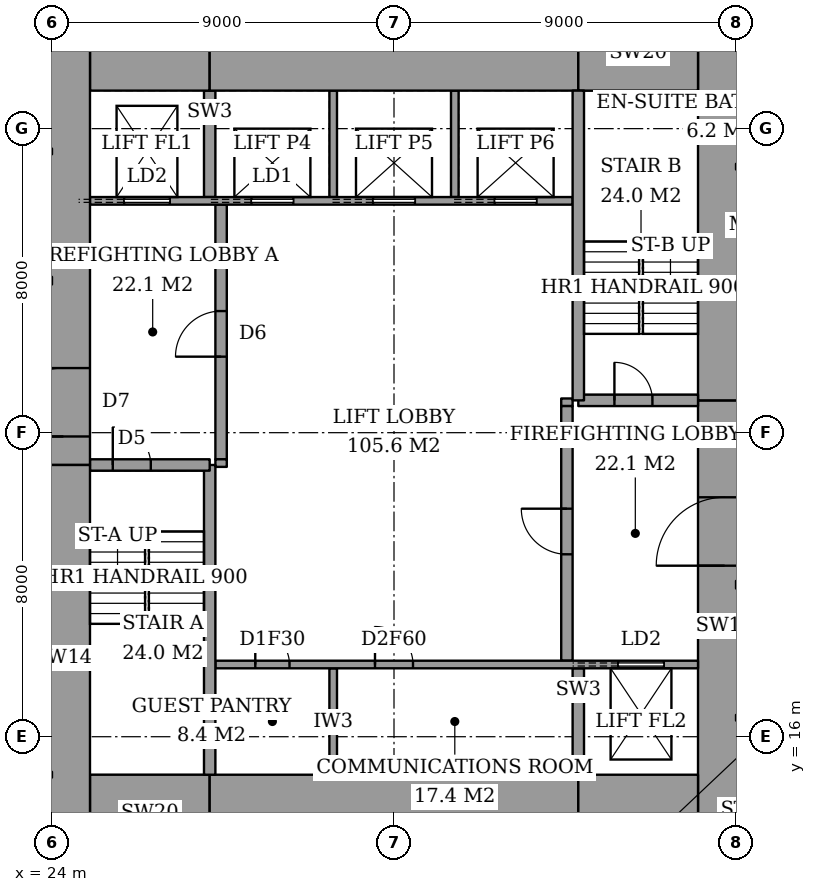
"""IFC4 building model, lengths in metres.
Left out: names, types, materials, properties, quantities, classifications, styles, units other than length and angle.
Written with IfcOpenShell. Run it as: python <this file> out.ifc"""

import sys

from ifc_helpers import new_model, si_unit, direction, frame, frame_2d, origin, place, context, subcontext, project, spatial, rectangle, extrude, element, fill, save


model = new_model("IFC4")
c1 = context("Model", 3, precision=1e-05, world=origin(), true_north=direction((0.0, 1.0)))
c2 = subcontext(c1, "Body", "Model", "MODEL_VIEW")
j1 = project(units=[si_unit("LENGTHUNIT", "METRE"), si_unit("PLANEANGLEUNIT", "RADIAN")], contexts=[c1])
p1 = place(None, origin())
s1 = spatial("IfcSite", under=j1, at=p1, CompositionType="ELEMENT")
p2 = place(p1, origin())
s2 = spatial("IfcBuilding", under=s1, at=p2, CompositionType="ELEMENT")
p3 = place(p2, frame((0.0, 0.0, 193.0)))
s3 = spatial("IfcBuildingStorey", under=s2, at=p3, CompositionType="ELEMENT", Elevation=193.0)
p4 = place(p3, frame((25.0, 14.0, 0.0), z_axis=(0.0, 0.0, 1.0), x_axis=(1.0, 0.0, 0.0)))
e1 = element("IfcWall", 1, at=p4, inside=s3, PredefinedType="SHEAR", context=c2, shape_type="SweptSolid", body=[
    extrude(rectangle(XDim=3.15, YDim=2.0, at=frame_2d((1.575, 0.0))), origin(), (0.0, 0.0, 1.0), 3.6),
])
p5 = place(p3, frame((28.15, 14.0, 0.0), z_axis=(0.0, 0.0, 1.0), x_axis=(1.0, 0.0, 0.0)))
e2 = element("IfcWall", 2, at=p5, inside=s3, PredefinedType="SHEAR", context=c2, shape_type="SweptSolid", body=[
    extrude(rectangle(XDim=9.7, YDim=2.0, at=frame_2d((4.85, 0.0))), origin(), (0.0, 0.0, 1.0), 3.6),
])
for number, where, z_axis, x_axis in (
    (3, (37.85, 14.0, 0.0), (0.0, 0.0, 1.0), (1.0, 0.0, 0.0)),
    (4, (25.0, 34.0, 0.0), (0.0, 0.0, 1.0), (1.0, 0.0, 0.0)),
):
    element("IfcWall", number, at=place(p3, frame(where, z_axis=z_axis, x_axis=x_axis)), inside=s3, PredefinedType="SHEAR", context=c2, shape_type="SweptSolid", body=[
        extrude(rectangle(XDim=3.15, YDim=2.0, at=frame_2d((1.575, 0.0))), origin(), (0.0, 0.0, 1.0), 3.6),
    ])
p6 = place(p3, frame((28.15, 34.0, 0.0), z_axis=(0.0, 0.0, 1.0), x_axis=(1.0, 0.0, 0.0)))
e5 = element("IfcWall", 5, at=p6, inside=s3, PredefinedType="SHEAR", context=c2, shape_type="SweptSolid", body=[
    extrude(rectangle(XDim=9.7, YDim=2.0, at=frame_2d((4.85, 0.0))), origin(), (0.0, 0.0, 1.0), 3.6),
])
p7 = place(p3, frame((37.85, 34.0, 0.0), z_axis=(0.0, 0.0, 1.0), x_axis=(1.0, 0.0, 0.0)))
e6 = element("IfcWall", 6, at=p7, inside=s3, PredefinedType="SHEAR", context=c2, shape_type="SweptSolid", body=[
    extrude(rectangle(XDim=3.15, YDim=2.0, at=frame_2d((1.575, 0.0))), origin(), (0.0, 0.0, 1.0), 3.6),
])
p8 = place(p3, frame((24.3, 13.0, 0.0), z_axis=(0.0, 0.0, 1.0), x_axis=(0.0, 1.0, 0.0)))
e7 = element("IfcWall", 7, at=p8, inside=s3, PredefinedType="SHEAR", context=c2, shape_type="SweptSolid", body=[
    extrude(rectangle(XDim=10.15, YDim=1.4, at=frame_2d((5.075, 0.0))), origin(), (0.0, 0.0, 1.0), 3.6),
])
p9 = place(p3, frame((24.3, 23.15, 0.0), z_axis=(0.0, 0.0, 1.0), x_axis=(0.0, 1.0, 0.0)))
e8 = element("IfcWall", 8, at=p9, inside=s3, PredefinedType="SHEAR", context=c2, shape_type="SweptSolid", body=[
    extrude(rectangle(XDim=11.85, YDim=1.4, at=frame_2d((5.925, 0.0))), origin(), (0.0, 0.0, 1.0), 3.6),
])
p10 = place(p9, frame((0.75, 0.0, 0.0)))
e9 = element("IfcOpeningElement", 9, at=p10, cuts=e8, PredefinedType="OPENING", context=c2, shape_type="SweptSolid", body=[
    extrude(rectangle(XDim=1.8, YDim=2.4, at=frame_2d((0.9, 1.2))), frame((0.0, 0.71, 0.0), z_axis=(0.0, -1.0, 0.0), x_axis=(1.0, 0.0, 0.0)), (0.0, 0.0, 1.0), 1.42),
])
p11 = place(p3, frame((41.7, 13.0, 0.0), z_axis=(0.0, 0.0, 1.0), x_axis=(0.0, 1.0, 0.0)))
e10 = element("IfcWall", 10, at=p11, inside=s3, PredefinedType="SHEAR", context=c2, shape_type="SweptSolid", body=[
    extrude(rectangle(XDim=11.85, YDim=1.4, at=frame_2d((5.925, 0.0))), origin(), (0.0, 0.0, 1.0), 3.6),
])
p12 = place(p11, frame((7.5, 0.0, 0.0)))
e11 = element("IfcOpeningElement", 11, at=p12, cuts=e10, PredefinedType="OPENING", context=c2, shape_type="SweptSolid", body=[
    extrude(rectangle(XDim=1.8, YDim=2.4, at=frame_2d((0.9, 1.2))), frame((0.0, 0.71, 0.0), z_axis=(0.0, -1.0, 0.0), x_axis=(1.0, 0.0, 0.0)), (0.0, 0.0, 1.0), 1.42),
])
p13 = place(p3, frame((41.7, 24.85, 0.0), z_axis=(0.0, 0.0, 1.0), x_axis=(0.0, 1.0, 0.0)))
e12 = element("IfcWall", 12, at=p13, inside=s3, PredefinedType="SHEAR", context=c2, shape_type="SweptSolid", body=[
    extrude(rectangle(XDim=10.15, YDim=1.4, at=frame_2d((5.075, 0.0))), origin(), (0.0, 0.0, 1.0), 3.6),
])
p14 = place(p3, frame((28.15, 15.0, 0.0), z_axis=(0.0, 0.0, 1.0), x_axis=(0.0, 1.0, 0.0)))
e13 = element("IfcWall", 13, at=p14, inside=s3, PredefinedType="SHEAR", context=c2, shape_type="SweptSolid", body=[
    extrude(rectangle(XDim=8.15, YDim=0.3, at=frame_2d((4.075, 0.0))), origin(), (0.0, 0.0, 1.0), 3.6),
])
p15 = place(p3, frame((25.0, 23.15, 0.0), z_axis=(0.0, 0.0, 1.0), x_axis=(1.0, 0.0, 0.0)))
e14 = element("IfcWall", 14, at=p15, inside=s3, PredefinedType="SHEAR", context=c2, shape_type="SweptSolid", body=[
    extrude(rectangle(XDim=3.15, YDim=0.3, at=frame_2d((1.575, 0.0))), origin(), (0.0, 0.0, 1.0), 3.6),
])
p16 = place(p15, frame((0.6, 0.0, 0.0)))
e15 = element("IfcOpeningElement", 15, at=p16, cuts=e14, PredefinedType="OPENING", context=c2, shape_type="SweptSolid", body=[
    extrude(rectangle(XDim=1.0, YDim=2.1, at=frame_2d((0.5, 1.05))), frame((0.0, 0.16, 0.0), z_axis=(0.0, -1.0, 0.0), x_axis=(1.0, 0.0, 0.0)), (0.0, 0.0, 1.0), 0.32),
])
p17 = place(p3, frame((37.85, 24.85, 0.0), z_axis=(0.0, 0.0, 1.0), x_axis=(0.0, 1.0, 0.0)))
e16 = element("IfcWall", 16, at=p17, inside=s3, PredefinedType="SHEAR", context=c2, shape_type="SweptSolid", body=[
    extrude(rectangle(XDim=8.15, YDim=0.3, at=frame_2d((4.075, 0.0))), origin(), (0.0, 0.0, 1.0), 3.6),
])
p18 = place(p3, frame((37.85, 24.85, 0.0), z_axis=(0.0, 0.0, 1.0), x_axis=(1.0, 0.0, 0.0)))
e17 = element("IfcWall", 17, at=p18, inside=s3, PredefinedType="SHEAR", context=c2, shape_type="SweptSolid", body=[
    extrude(rectangle(XDim=3.15, YDim=0.3, at=frame_2d((1.575, 0.0))), origin(), (0.0, 0.0, 1.0), 3.6),
])
p19 = place(p18, frame((0.95, 0.0, 0.0)))
e18 = element("IfcOpeningElement", 18, at=p19, cuts=e17, PredefinedType="OPENING", context=c2, shape_type="SweptSolid", body=[
    extrude(rectangle(XDim=1.0, YDim=2.1, at=frame_2d((0.5, 1.05))), frame((0.0, 0.16, 0.0), z_axis=(0.0, -1.0, 0.0), x_axis=(1.0, 0.0, 0.0)), (0.0, 0.0, 1.0), 0.32),
])
p20 = place(p3, frame((28.45, 23.3, 0.0), z_axis=(0.0, 0.0, 1.0), x_axis=(0.0, 1.0, 0.0)))
e19 = element("IfcWall", 19, at=p20, inside=s3, PredefinedType="PARTITIONING", context=c2, shape_type="SweptSolid", body=[
    extrude(rectangle(XDim=6.7, YDim=0.3, at=frame_2d((3.35, 0.0))), origin(), (0.0, 0.0, 1.0), 3.6),
])
p21 = place(p20, frame((2.7, 0.0, 0.0)))
e20 = element("IfcOpeningElement", 20, at=p21, cuts=e19, PredefinedType="OPENING", context=c2, shape_type="SweptSolid", body=[
    extrude(rectangle(XDim=1.2, YDim=2.1, at=frame_2d((0.6, 1.05))), frame((0.0, 0.16, 0.0), z_axis=(0.0, -1.0, 0.0), x_axis=(1.0, 0.0, 0.0)), (0.0, 0.0, 1.0), 0.32),
])
p22 = place(p3, frame((37.55, 18.0, 0.0), z_axis=(0.0, 0.0, 1.0), x_axis=(0.0, 1.0, 0.0)))
e21 = element("IfcWall", 21, at=p22, inside=s3, PredefinedType="PARTITIONING", context=c2, shape_type="SweptSolid", body=[
    extrude(rectangle(XDim=6.7, YDim=0.3, at=frame_2d((3.35, 0.0))), origin(), (0.0, 0.0, 1.0), 3.6),
])
p23 = place(p22, frame((2.8, 0.0, 0.0)))
e22 = element("IfcOpeningElement", 22, at=p23, cuts=e21, PredefinedType="OPENING", context=c2, shape_type="SweptSolid", body=[
    extrude(rectangle(XDim=1.2, YDim=2.1, at=frame_2d((0.6, 1.05))), frame((0.0, 0.16, 0.0), z_axis=(0.0, -1.0, 0.0), x_axis=(1.0, 0.0, 0.0)), (0.0, 0.0, 1.0), 0.32),
])
p24 = place(p3, frame((28.3, 17.9, 0.0), z_axis=(0.0, 0.0, 1.0), x_axis=(1.0, 0.0, 0.0)))
e23 = element("IfcWall", 23, at=p24, inside=s3, PredefinedType="PARTITIONING", context=c2, shape_type="SweptSolid", body=[
    extrude(rectangle(XDim=12.7, YDim=0.2, at=frame_2d((6.35, 0.0))), origin(), (0.0, 0.0, 1.0), 3.6),
])
p25 = place(p24, frame((1.05, 0.0, 0.0)))
e24 = element("IfcOpeningElement", 24, at=p25, cuts=e23, PredefinedType="OPENING", context=c2, shape_type="SweptSolid", body=[
    extrude(rectangle(XDim=0.9, YDim=2.1, at=frame_2d((0.45, 1.05))), frame((0.0, 0.11, 0.0), z_axis=(0.0, -1.0, 0.0), x_axis=(1.0, 0.0, 0.0)), (0.0, 0.0, 1.0), 0.22),
])
p26 = place(p24, frame((4.2, 0.0, 0.0)))
e25 = element("IfcOpeningElement", 25, at=p26, cuts=e23, PredefinedType="OPENING", context=c2, shape_type="SweptSolid", body=[
    extrude(rectangle(XDim=1.0, YDim=2.1, at=frame_2d((0.5, 1.05))), frame((0.0, 0.11, 0.0), z_axis=(0.0, -1.0, 0.0), x_axis=(1.0, 0.0, 0.0)), (0.0, 0.0, 1.0), 0.22),
])
p27 = place(p24, frame((10.6, 0.0, 0.0)))
e26 = element("IfcOpeningElement", 26, at=p27, cuts=e23, PredefinedType="OPENING", context=c2, shape_type="SweptSolid", body=[
    extrude(rectangle(XDim=1.2, YDim=2.1, at=frame_2d((0.6, 1.05))), frame((0.0, 0.11, 0.0), z_axis=(0.0, -1.0, 0.0), x_axis=(1.0, 0.0, 0.0)), (0.0, 0.0, 1.0), 0.22),
])
p28 = place(p3, frame((25.0, 30.1, 0.0), z_axis=(0.0, 0.0, 1.0), x_axis=(1.0, 0.0, 0.0)))
e27 = element("IfcWall", 27, at=p28, inside=s3, PredefinedType="PARTITIONING", context=c2, shape_type="SweptSolid", body=[
    extrude(rectangle(XDim=12.7, YDim=0.2, at=frame_2d((6.35, 0.0))), origin(), (0.0, 0.0, 1.0), 3.6),
])
p29 = place(p28, frame((4.25, 0.0, 0.0)))
e28 = element("IfcOpeningElement", 28, at=p29, cuts=e27, PredefinedType="OPENING", context=c2, shape_type="SweptSolid", body=[
    extrude(rectangle(XDim=1.1, YDim=2.1, at=frame_2d((0.55, 1.05))), frame((0.0, 0.11, 0.0), z_axis=(0.0, -1.0, 0.0), x_axis=(1.0, 0.0, 0.0)), (0.0, 0.0, 1.0), 0.22),
])
p30 = place(p28, frame((7.45, 0.0, 0.0)))
e29 = element("IfcOpeningElement", 29, at=p30, cuts=e27, PredefinedType="OPENING", context=c2, shape_type="SweptSolid", body=[
    extrude(rectangle(XDim=1.1, YDim=2.1, at=frame_2d((0.55, 1.05))), frame((0.0, 0.11, 0.0), z_axis=(0.0, -1.0, 0.0), x_axis=(1.0, 0.0, 0.0)), (0.0, 0.0, 1.0), 0.22),
])
p31 = place(p28, frame((10.65, 0.0, 0.0)))
e30 = element("IfcOpeningElement", 30, at=p31, cuts=e27, PredefinedType="OPENING", context=c2, shape_type="SweptSolid", body=[
    extrude(rectangle(XDim=1.1, YDim=2.1, at=frame_2d((0.55, 1.05))), frame((0.0, 0.11, 0.0), z_axis=(0.0, -1.0, 0.0), x_axis=(1.0, 0.0, 0.0)), (0.0, 0.0, 1.0), 0.22),
])
p32 = place(p28, frame((0.9, 0.0, 0.0)))
e31 = element("IfcOpeningElement", 31, at=p32, cuts=e27, PredefinedType="OPENING", context=c2, shape_type="SweptSolid", body=[
    extrude(rectangle(XDim=1.2, YDim=2.1, at=frame_2d((0.6, 1.05))), frame((0.0, 0.11, 0.0), z_axis=(0.0, -1.0, 0.0), x_axis=(1.0, 0.0, 0.0)), (0.0, 0.0, 1.0), 0.22),
])
p33 = place(p3, frame((31.4, 15.0, 0.0), z_axis=(0.0, 0.0, 1.0), x_axis=(0.0, 1.0, 0.0)))
e32 = element("IfcWall", 32, at=p33, inside=s3, PredefinedType="PARTITIONING", context=c2, shape_type="SweptSolid", body=[
    extrude(rectangle(XDim=2.8, YDim=0.2, at=frame_2d((1.4, 0.0))), origin(), (0.0, 0.0, 1.0), 3.6),
])
p34 = place(p3, frame((37.85, 15.0, 0.0), z_axis=(0.0, 0.0, 1.0), x_axis=(0.0, 1.0, 0.0)))
e33 = element("IfcWall", 33, at=p34, inside=s3, PredefinedType="SHEAR", context=c2, shape_type="SweptSolid", body=[
    extrude(rectangle(XDim=2.8, YDim=0.3, at=frame_2d((1.4, 0.0))), origin(), (0.0, 0.0, 1.0), 3.6),
])
for number, where, z_axis, x_axis in (
    (34, (31.4, 30.2, 0.0), (0.0, 0.0, 1.0), (0.0, 1.0, 0.0)),
    (35, (34.6, 30.2, 0.0), (0.0, 0.0, 1.0), (0.0, 1.0, 0.0)),
):
    element("IfcWall", number, at=place(p3, frame(where, z_axis=z_axis, x_axis=x_axis)), inside=s3, PredefinedType="PARTITIONING", context=c2, shape_type="SweptSolid", body=[
        extrude(rectangle(XDim=2.8, YDim=0.2, at=frame_2d((1.4, 0.0))), origin(), (0.0, 0.0, 1.0), 3.6),
    ])
p35 = place(p3, frame((28.15, 30.2, 0.0), z_axis=(0.0, 0.0, 1.0), x_axis=(0.0, 1.0, 0.0)))
e36 = element("IfcWall", 36, at=p35, inside=s3, PredefinedType="SHEAR", context=c2, shape_type="SweptSolid", body=[
    extrude(rectangle(XDim=2.8, YDim=0.3, at=frame_2d((1.4, 0.0))), origin(), (0.0, 0.0, 1.0), 3.6),
])
for number, where, z_axis, x_axis in (
    (37, (28.3, 23.2, 0.0), (0.0, 0.0, 1.0), (1.0, 0.0, 0.0)),
    (38, (37.4, 24.8, 0.0), (0.0, 0.0, 1.0), (1.0, 0.0, 0.0)),
):
    element("IfcWall", number, at=place(p3, frame(where, z_axis=z_axis, x_axis=x_axis)), inside=s3, PredefinedType="PARTITIONING", context=c2, shape_type="SweptSolid", body=[
        extrude(rectangle(XDim=0.3, YDim=0.2, at=frame_2d((0.15, 0.0))), origin(), (0.0, 0.0, 1.0), 3.6),
    ])
p36 = place(p16, origin())
e39 = element("IfcDoor", 39, at=p36, inside=s3, OperationType="SINGLE_SWING_RIGHT", PredefinedType="DOOR", context=c2, shape_type="SweptSolid", body=[
    extrude(rectangle(XDim=1.0, YDim=2.1, at=frame_2d((0.5, 1.05))), frame((0.0, 0.025, 0.0), z_axis=(0.0, -1.0, 0.0), x_axis=(1.0, 0.0, 0.0)), (0.0, 0.0, 1.0), 0.05),
])
fill(e15, e39)
p37 = place(p19, origin())
e40 = element("IfcDoor", 40, at=p37, inside=s3, OperationType="SINGLE_SWING_RIGHT", PredefinedType="DOOR", context=c2, shape_type="SweptSolid", body=[
    extrude(rectangle(XDim=1.0, YDim=2.1, at=frame_2d((0.5, 1.05))), frame((0.0, 0.025, 0.0), z_axis=(0.0, -1.0, 0.0), x_axis=(1.0, 0.0, 0.0)), (0.0, 0.0, 1.0), 0.05),
])
fill(e18, e40)
p38 = place(p21, origin())
e41 = element("IfcDoor", 41, at=p38, inside=s3, OperationType="SINGLE_SWING_RIGHT", PredefinedType="DOOR", context=c2, shape_type="SweptSolid", body=[
    extrude(rectangle(XDim=1.2, YDim=2.1, at=frame_2d((0.6, 1.05))), frame((0.0, 0.025, 0.0), z_axis=(0.0, -1.0, 0.0), x_axis=(1.0, 0.0, 0.0)), (0.0, 0.0, 1.0), 0.05),
])
fill(e20, e41)
p39 = place(p23, origin())
e42 = element("IfcDoor", 42, at=p39, inside=s3, OperationType="SINGLE_SWING_LEFT", PredefinedType="DOOR", context=c2, shape_type="SweptSolid", body=[
    extrude(rectangle(XDim=1.2, YDim=2.1, at=frame_2d((0.6, 1.05))), frame((0.0, 0.025, 0.0), z_axis=(0.0, -1.0, 0.0), x_axis=(1.0, 0.0, 0.0)), (0.0, 0.0, 1.0), 0.05),
])
fill(e22, e42)
p40 = place(p10, origin())
e43 = element("IfcDoor", 43, at=p40, inside=s3, OperationType="DOUBLE_DOOR_DOUBLE_SWING", PredefinedType="DOOR", context=c2, shape_type="SweptSolid", body=[
    extrude(rectangle(XDim=1.8, YDim=2.4, at=frame_2d((0.9, 1.2))), frame((0.0, 0.025, 0.0), z_axis=(0.0, -1.0, 0.0), x_axis=(1.0, 0.0, 0.0)), (0.0, 0.0, 1.0), 0.05),
])
fill(e9, e43)
p41 = place(p12, origin())
e44 = element("IfcDoor", 44, at=p41, inside=s3, OperationType="DOUBLE_DOOR_DOUBLE_SWING", PredefinedType="DOOR", context=c2, shape_type="SweptSolid", body=[
    extrude(rectangle(XDim=1.8, YDim=2.4, at=frame_2d((0.9, 1.2))), frame((0.0, 0.025, 0.0), z_axis=(0.0, -1.0, 0.0), x_axis=(1.0, 0.0, 0.0)), (0.0, 0.0, 1.0), 0.05),
])
fill(e11, e44)
p42 = place(p25, origin())
e45 = element("IfcDoor", 45, at=p42, inside=s3, OperationType="SINGLE_SWING_RIGHT", PredefinedType="DOOR", context=c2, shape_type="SweptSolid", body=[
    extrude(rectangle(XDim=0.9, YDim=2.1, at=frame_2d((0.45, 1.05))), frame((0.0, 0.025, 0.0), z_axis=(0.0, -1.0, 0.0), x_axis=(1.0, 0.0, 0.0)), (0.0, 0.0, 1.0), 0.05),
])
fill(e24, e45)
p43 = place(p26, origin())
e46 = element("IfcDoor", 46, at=p43, inside=s3, OperationType="SINGLE_SWING_RIGHT", PredefinedType="DOOR", context=c2, shape_type="SweptSolid", body=[
    extrude(rectangle(XDim=1.0, YDim=2.1, at=frame_2d((0.5, 1.05))), frame((0.0, 0.025, 0.0), z_axis=(0.0, -1.0, 0.0), x_axis=(1.0, 0.0, 0.0)), (0.0, 0.0, 1.0), 0.05),
])
fill(e25, e46)
p44 = place(p29, origin())
e47 = element("IfcDoor", 47, at=p44, inside=s3, OperationType="SLIDING_TO_LEFT", PredefinedType="DOOR", context=c2, shape_type="SweptSolid", body=[
    extrude(rectangle(XDim=1.1, YDim=2.1, at=frame_2d((0.55, 1.05))), frame((0.0, 0.025, 0.0), z_axis=(0.0, -1.0, 0.0), x_axis=(1.0, 0.0, 0.0)), (0.0, 0.0, 1.0), 0.05),
])
fill(e28, e47)
p45 = place(p30, origin())
e48 = element("IfcDoor", 48, at=p45, inside=s3, OperationType="SLIDING_TO_LEFT", PredefinedType="DOOR", context=c2, shape_type="SweptSolid", body=[
    extrude(rectangle(XDim=1.1, YDim=2.1, at=frame_2d((0.55, 1.05))), frame((0.0, 0.025, 0.0), z_axis=(0.0, -1.0, 0.0), x_axis=(1.0, 0.0, 0.0)), (0.0, 0.0, 1.0), 0.05),
])
fill(e29, e48)
p46 = place(p31, origin())
e49 = element("IfcDoor", 49, at=p46, inside=s3, OperationType="SLIDING_TO_LEFT", PredefinedType="DOOR", context=c2, shape_type="SweptSolid", body=[
    extrude(rectangle(XDim=1.1, YDim=2.1, at=frame_2d((0.55, 1.05))), frame((0.0, 0.025, 0.0), z_axis=(0.0, -1.0, 0.0), x_axis=(1.0, 0.0, 0.0)), (0.0, 0.0, 1.0), 0.05),
])
fill(e30, e49)
p47 = place(p32, origin())
e50 = element("IfcDoor", 50, at=p47, inside=s3, OperationType="SLIDING_TO_LEFT", PredefinedType="DOOR", context=c2, shape_type="SweptSolid", body=[
    extrude(rectangle(XDim=1.2, YDim=2.1, at=frame_2d((0.6, 1.05))), frame((0.0, 0.025, 0.0), z_axis=(0.0, -1.0, 0.0), x_axis=(1.0, 0.0, 0.0)), (0.0, 0.0, 1.0), 0.05),
])
fill(e31, e50)
p48 = place(p27, origin())
e51 = element("IfcDoor", 51, at=p48, inside=s3, OperationType="SLIDING_TO_LEFT", PredefinedType="DOOR", context=c2, shape_type="SweptSolid", body=[
    extrude(rectangle(XDim=1.2, YDim=2.1, at=frame_2d((0.6, 1.05))), frame((0.0, 0.025, 0.0), z_axis=(0.0, -1.0, 0.0), x_axis=(1.0, 0.0, 0.0)), (0.0, 0.0, 1.0), 0.05),
])
fill(e26, e51)
save(model, sys.argv[1])
